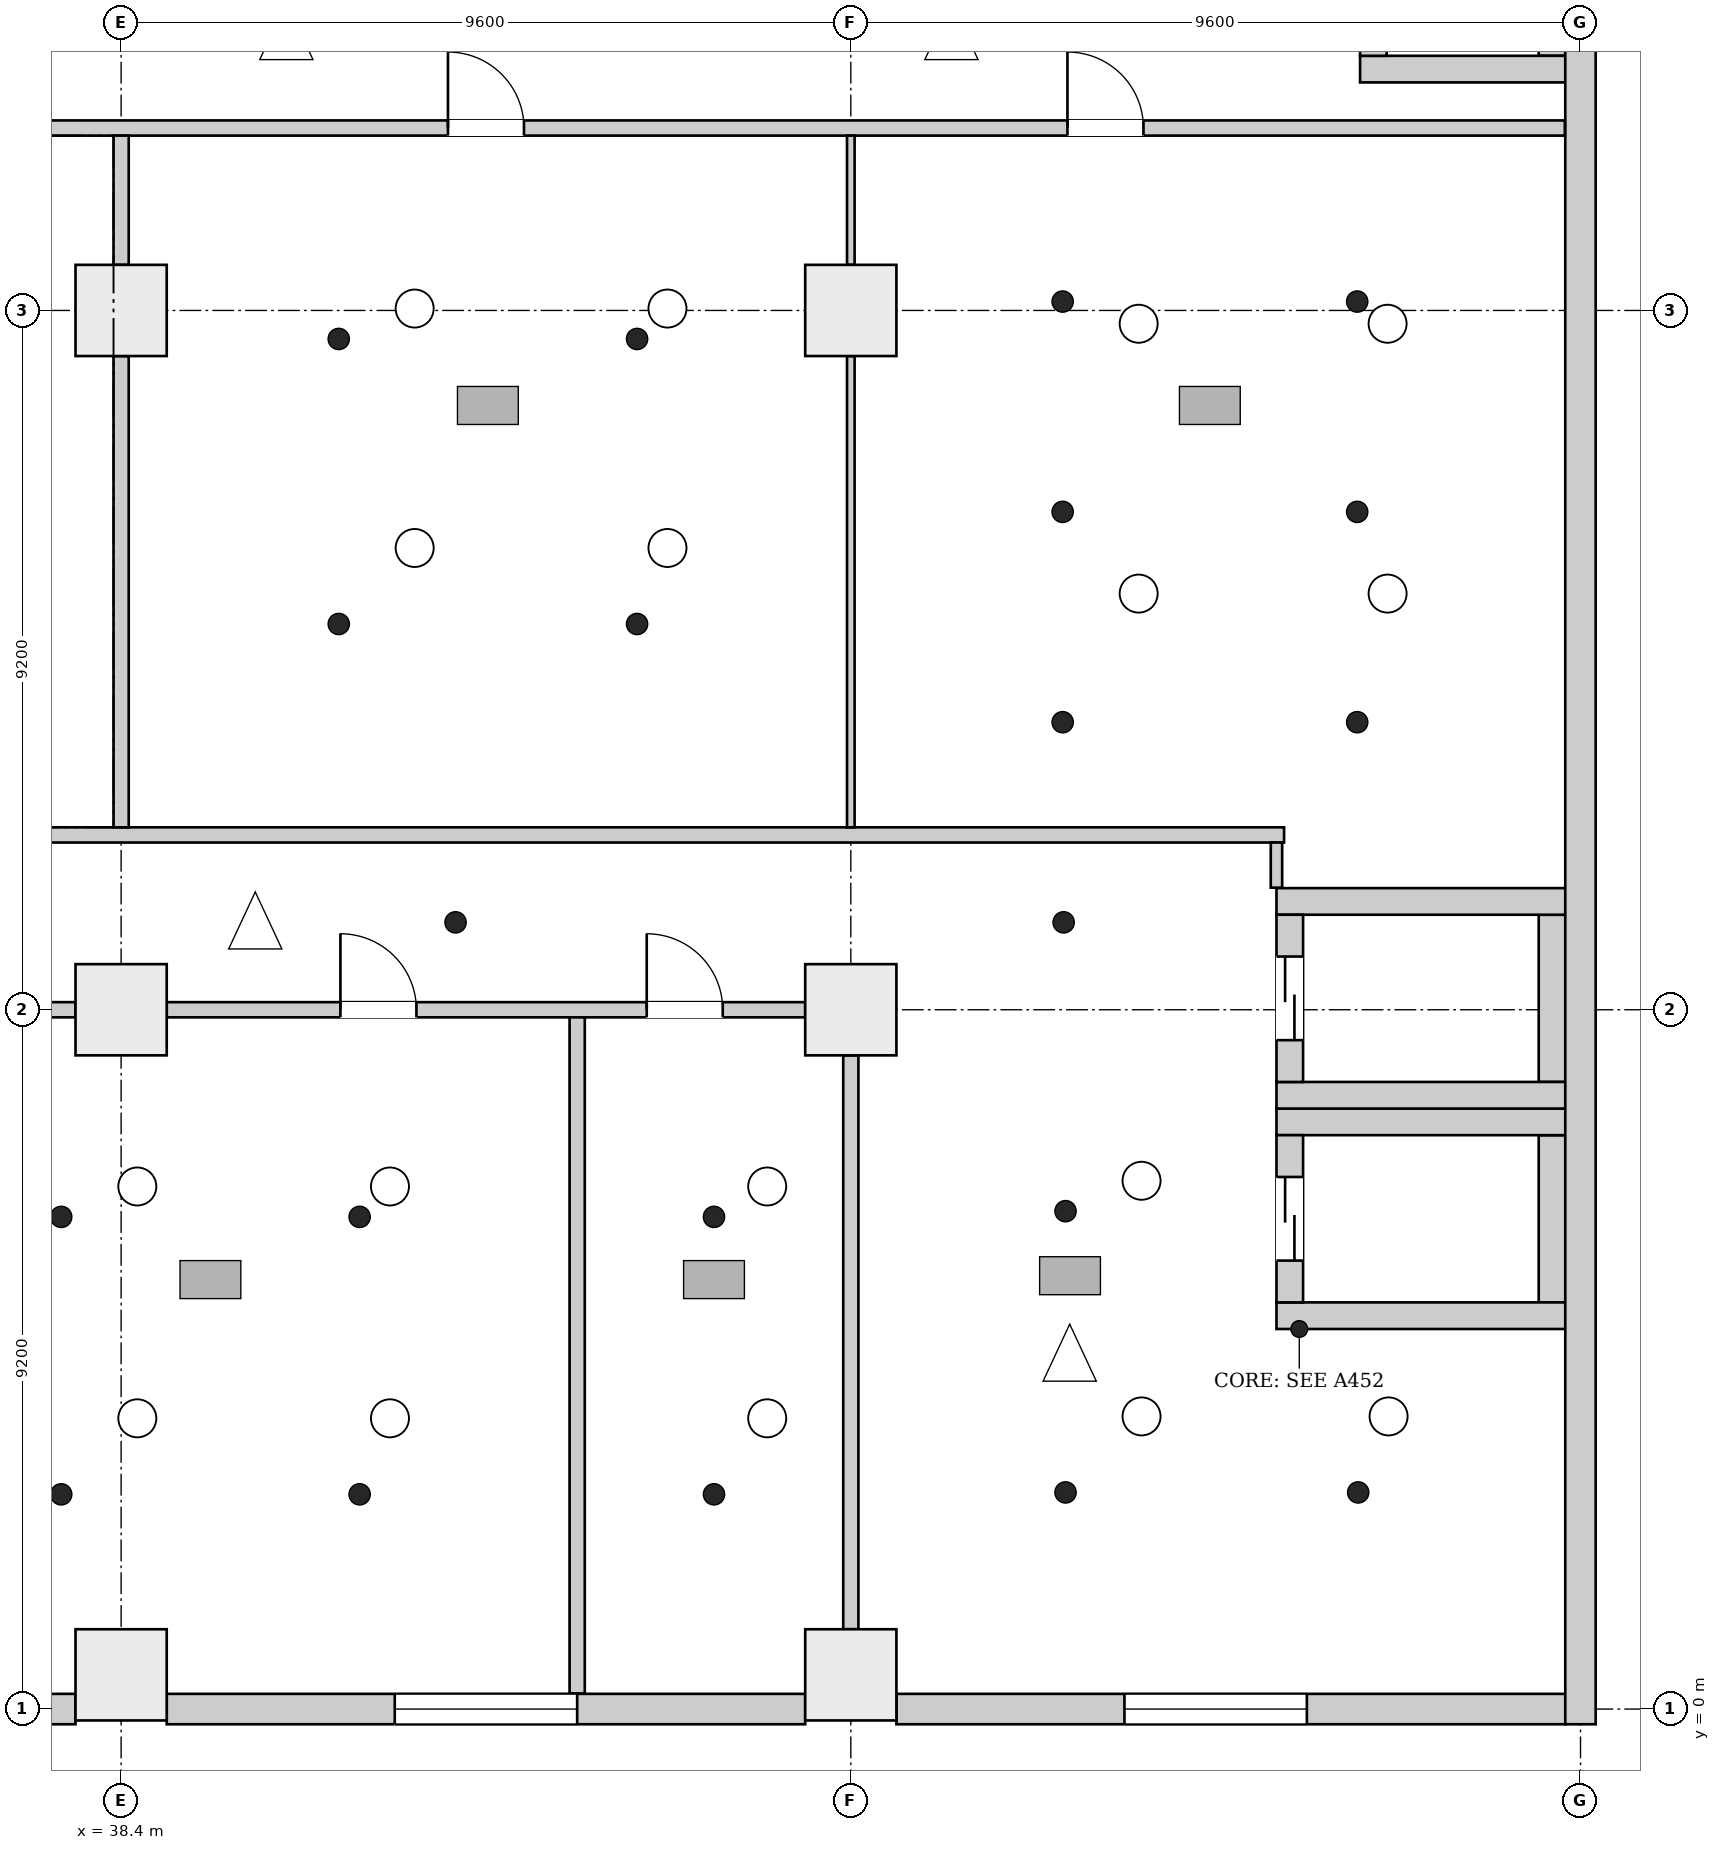
"""IFC4 building model, lengths in metres.
Left out: names, types, materials, properties, quantities, classifications, styles, units other than length and angle.
Written with IfcOpenShell. Run it as: python <this file> out.ifc"""

import sys

from ifc_helpers import new_model, si_unit, direction, frame, frame_2d, origin, origin_2d, place, context, subcontext, project, spatial, rectangle, extrude, element, fill, save


model = new_model("IFC4")
c1 = context("Model", 3, precision=1e-05, world=origin(), true_north=direction((0.0, 1.0)))
c2 = subcontext(c1, "Body", "Model", "MODEL_VIEW")
j1 = project(units=[si_unit("LENGTHUNIT", "METRE"), si_unit("PLANEANGLEUNIT", "RADIAN")], contexts=[c1])
p1 = place(None, origin())
s1 = spatial("IfcSite", under=j1, at=p1, CompositionType="ELEMENT")
p2 = place(p1, origin())
s2 = spatial("IfcBuilding", under=s1, at=p2, CompositionType="ELEMENT")
p3 = place(p2, frame((0.0, 0.0, 14.2)))
s3 = spatial("IfcBuildingStorey", under=s2, at=p3, CompositionType="ELEMENT", Elevation=14.2)
p4 = place(p3, frame((57.6, -0.2, 0.0), z_axis=(0.0, 0.0, 1.0), x_axis=(0.0, 1.0, 0.0)))
e1 = element("IfcWall", 1, at=p4, inside=s3, PredefinedType="SHEAR", context=c2, shape_type="SweptSolid", body=[
    extrude(rectangle(XDim=46.88, YDim=0.4, at=frame_2d((23.44, 0.0))), origin(), (0.0, 0.0, 1.0), 7.5),
])
for number, where, z_axis, x_axis in (
    (2, (53.6, 5.175, 0.0), (0.0, 0.0, 1.0), (1.0, 0.0, 0.0)),
    (3, (53.6, 7.725, 0.0), (0.0, 0.0, 1.0), (1.0, 0.0, 0.0)),
):
    element("IfcWall", number, at=place(p3, frame(where, z_axis=z_axis, x_axis=x_axis)), inside=s3, PredefinedType="SHEAR", context=c2, shape_type="SweptSolid", body=[
        extrude(rectangle(XDim=3.8, YDim=0.35, at=frame_2d((1.9, 0.0))), origin(), (0.0, 0.0, 1.0), 7.5),
    ])
p5 = place(p3, frame((53.775, 5.35, 0.0), z_axis=(0.0, 0.0, 1.0), x_axis=(0.0, 1.0, 0.0)))
e4 = element("IfcWall", 4, at=p5, inside=s3, PredefinedType="SHEAR", context=c2, shape_type="SweptSolid", body=[
    extrude(rectangle(XDim=2.2, YDim=0.35, at=frame_2d((1.1, 0.0))), origin(), (0.0, 0.0, 1.0), 7.5),
])
p6 = place(p5, frame((0.55, 0.0, 0.0)))
e5 = element("IfcOpeningElement", 5, at=p6, cuts=e4, PredefinedType="OPENING", context=c2, shape_type="SweptSolid", body=[
    extrude(rectangle(XDim=1.1, YDim=2.1, at=frame_2d((0.55, 1.05))), frame((0.0, 0.185, 0.0), z_axis=(0.0, -1.0, 0.0), x_axis=(1.0, 0.0, 0.0)), (0.0, 0.0, 1.0), 0.37),
])
p7 = place(p3, frame((57.225, 5.35, 0.0), z_axis=(0.0, 0.0, 1.0), x_axis=(0.0, 1.0, 0.0)))
e6 = element("IfcWall", 6, at=p7, inside=s3, PredefinedType="SHEAR", context=c2, shape_type="SweptSolid", body=[
    extrude(rectangle(XDim=2.2, YDim=0.35, at=frame_2d((1.1, 0.0))), origin(), (0.0, 0.0, 1.0), 7.5),
])
for number, where, z_axis, x_axis in (
    (7, (53.6, 8.075, 0.0), (0.0, 0.0, 1.0), (1.0, 0.0, 0.0)),
    (8, (53.6, 10.625, 0.0), (0.0, 0.0, 1.0), (1.0, 0.0, 0.0)),
):
    element("IfcWall", number, at=place(p3, frame(where, z_axis=z_axis, x_axis=x_axis)), inside=s3, PredefinedType="SHEAR", context=c2, shape_type="SweptSolid", body=[
        extrude(rectangle(XDim=3.8, YDim=0.35, at=frame_2d((1.9, 0.0))), origin(), (0.0, 0.0, 1.0), 7.5),
    ])
p8 = place(p3, frame((53.775, 8.25, 0.0), z_axis=(0.0, 0.0, 1.0), x_axis=(0.0, 1.0, 0.0)))
e9 = element("IfcWall", 9, at=p8, inside=s3, PredefinedType="SHEAR", context=c2, shape_type="SweptSolid", body=[
    extrude(rectangle(XDim=2.2, YDim=0.35, at=frame_2d((1.1, 0.0))), origin(), (0.0, 0.0, 1.0), 7.5),
])
p9 = place(p8, frame((0.55, 0.0, 0.0)))
e10 = element("IfcOpeningElement", 10, at=p9, cuts=e9, PredefinedType="OPENING", context=c2, shape_type="SweptSolid", body=[
    extrude(rectangle(XDim=1.1, YDim=2.1, at=frame_2d((0.55, 1.05))), frame((0.0, 0.185, 0.0), z_axis=(0.0, -1.0, 0.0), x_axis=(1.0, 0.0, 0.0)), (0.0, 0.0, 1.0), 0.37),
])
p10 = place(p3, frame((57.225, 8.25, 0.0), z_axis=(0.0, 0.0, 1.0), x_axis=(0.0, 1.0, 0.0)))
e11 = element("IfcWall", 11, at=p10, inside=s3, PredefinedType="SHEAR", context=c2, shape_type="SweptSolid", body=[
    extrude(rectangle(XDim=2.2, YDim=0.35, at=frame_2d((1.1, 0.0))), origin(), (0.0, 0.0, 1.0), 7.5),
])
p11 = place(p3, frame((54.7, 21.575, 0.0), z_axis=(0.0, 0.0, 1.0), x_axis=(1.0, 0.0, 0.0)))
e12 = element("IfcWall", 12, at=p11, inside=s3, PredefinedType="SHEAR", context=c2, shape_type="SweptSolid", body=[
    extrude(rectangle(XDim=2.7, YDim=0.35, at=frame_2d((1.35, 0.0))), origin(), (0.0, 0.0, 1.0), 7.5),
])
for number, where, z_axis, x_axis in (
    (13, (54.875, 21.75, 0.0), (0.0, 0.0, 1.0), (0.0, 1.0, 0.0)),
    (14, (57.225, 21.75, 0.0), (0.0, 0.0, 1.0), (0.0, 1.0, 0.0)),
):
    element("IfcWall", number, at=place(p3, frame(where, z_axis=z_axis, x_axis=x_axis)), inside=s3, PredefinedType="SHEAR", context=c2, shape_type="SweptSolid", body=[
        extrude(rectangle(XDim=3.5, YDim=0.35, at=frame_2d((1.75, 0.0))), origin(), (0.0, 0.0, 1.0), 7.5),
    ])
for number, where, z_axis, x_axis in (
    (15, (38.4, 0.45, 0.0), (0.0, 0.0, 1.0), (1.0, 0.0, 0.0)),
    (16, (48.0, 0.45, 0.0), (0.0, 0.0, 1.0), (1.0, 0.0, 0.0)),
    (17, (38.4, 9.2, 0.0), (0.0, 0.0, 1.0), (1.0, 0.0, 0.0)),
    (18, (48.0, 9.2, 0.0), (0.0, 0.0, 1.0), (1.0, 0.0, 0.0)),
    (19, (38.4, 18.4, 0.0), (0.0, 0.0, 1.0), (1.0, 0.0, 0.0)),
    (20, (48.0, 18.4, 0.0), (0.0, 0.0, 1.0), (1.0, 0.0, 0.0)),
):
    element("IfcColumn", number, at=place(p3, frame(where, z_axis=z_axis, x_axis=x_axis)), inside=s3, PredefinedType="COLUMN", context=c2, shape_type="SweptSolid", body=[
        extrude(rectangle(XDim=1.2, YDim=1.2, at=origin_2d()), origin(), (0.0, 0.0, 1.0), 7.5),
    ])
p12 = place(p3, frame((29.4, 0.0, 0.0), z_axis=(0.0, 0.0, 1.0), x_axis=(1.0, 0.0, 0.0)))
e21 = element("IfcWall", 21, at=p12, inside=s3, PredefinedType="ELEMENTEDWALL", context=c2, shape_type="SweptSolid", body=[
    extrude(rectangle(XDim=8.4, YDim=0.4, at=frame_2d((4.2, 0.0))), origin(), (0.0, 0.0, 1.0), 7.15),
])
p13 = place(p12, frame((3.0, 0.0, 1.0)))
e22 = element("IfcOpeningElement", 22, at=p13, cuts=e21, PredefinedType="OPENING", context=c2, shape_type="SweptSolid", body=[
    extrude(rectangle(XDim=2.4, YDim=2.2, at=frame_2d((1.2, 1.1))), frame((0.0, 0.21, 0.0), z_axis=(0.0, -1.0, 0.0), x_axis=(1.0, 0.0, 0.0)), (0.0, 0.0, 1.0), 0.42),
])
p14 = place(p3, frame((39.0, 0.0, 0.0), z_axis=(0.0, 0.0, 1.0), x_axis=(1.0, 0.0, 0.0)))
e23 = element("IfcWall", 23, at=p14, inside=s3, PredefinedType="ELEMENTEDWALL", context=c2, shape_type="SweptSolid", body=[
    extrude(rectangle(XDim=8.4, YDim=0.4, at=frame_2d((4.2, 0.0))), origin(), (0.0, 0.0, 1.0), 7.15),
])
p15 = place(p14, frame((3.0, 0.0, 1.0)))
e24 = element("IfcOpeningElement", 24, at=p15, cuts=e23, PredefinedType="OPENING", context=c2, shape_type="SweptSolid", body=[
    extrude(rectangle(XDim=2.4, YDim=2.2, at=frame_2d((1.2, 1.1))), frame((0.0, 0.21, 0.0), z_axis=(0.0, -1.0, 0.0), x_axis=(1.0, 0.0, 0.0)), (0.0, 0.0, 1.0), 0.42),
])
p16 = place(p3, frame((48.6, 0.0, 0.0), z_axis=(0.0, 0.0, 1.0), x_axis=(1.0, 0.0, 0.0)))
e25 = element("IfcWall", 25, at=p16, inside=s3, PredefinedType="ELEMENTEDWALL", context=c2, shape_type="SweptSolid", body=[
    extrude(rectangle(XDim=8.8, YDim=0.4, at=frame_2d((4.4, 0.0))), origin(), (0.0, 0.0, 1.0), 7.15),
])
p17 = place(p16, frame((3.0, 0.0, 1.0)))
e26 = element("IfcOpeningElement", 26, at=p17, cuts=e25, PredefinedType="OPENING", context=c2, shape_type="SweptSolid", body=[
    extrude(rectangle(XDim=2.4, YDim=2.2, at=frame_2d((1.2, 1.1))), frame((0.0, 0.21, 0.0), z_axis=(0.0, -1.0, 0.0), x_axis=(1.0, 0.0, 0.0)), (0.0, 0.0, 1.0), 0.42),
])
p18 = place(p3, frame((27.206, 11.5, 0.0), z_axis=(0.0, 0.0, 1.0), x_axis=(1.0, 0.0, 0.0)))
e27 = element("IfcWall", 27, at=p18, inside=s3, PredefinedType="PARTITIONING", context=c2, shape_type="SweptSolid", body=[
    extrude(rectangle(XDim=26.494, YDim=0.2, at=frame_2d((13.247, 0.0))), origin(), (0.0, 0.0, 1.0), 7.15),
])
p19 = place(p3, frame((28.9, 20.8, 0.0), z_axis=(0.0, 0.0, 1.0), x_axis=(1.0, 0.0, 0.0)))
e28 = element("IfcWall", 28, at=p19, inside=s3, PredefinedType="PARTITIONING", context=c2, shape_type="SweptSolid", body=[
    extrude(rectangle(XDim=28.494, YDim=0.2, at=frame_2d((14.247, 0.0))), origin(), (0.0, 0.0, 1.0), 7.15),
])
p20 = place(p19, frame((4.335, 0.0, 0.0)))
e29 = element("IfcOpeningElement", 29, at=p20, cuts=e28, PredefinedType="OPENING", context=c2, shape_type="SweptSolid", body=[
    extrude(rectangle(XDim=1.0, YDim=2.1, at=frame_2d((0.5, 1.05))), frame((0.0, 0.11, 0.0), z_axis=(0.0, -1.0, 0.0), x_axis=(1.0, 0.0, 0.0)), (0.0, 0.0, 1.0), 0.22),
])
p21 = place(p19, frame((13.8, 0.0, 0.0)))
e30 = element("IfcOpeningElement", 30, at=p21, cuts=e28, PredefinedType="OPENING", context=c2, shape_type="SweptSolid", body=[
    extrude(rectangle(XDim=1.0, YDim=2.1, at=frame_2d((0.5, 1.05))), frame((0.0, 0.11, 0.0), z_axis=(0.0, -1.0, 0.0), x_axis=(1.0, 0.0, 0.0)), (0.0, 0.0, 1.0), 0.22),
])
p22 = place(p19, frame((21.95, 0.0, 0.0)))
e31 = element("IfcOpeningElement", 31, at=p22, cuts=e28, PredefinedType="OPENING", context=c2, shape_type="SweptSolid", body=[
    extrude(rectangle(XDim=1.0, YDim=2.1, at=frame_2d((0.5, 1.05))), frame((0.0, 0.11, 0.0), z_axis=(0.0, -1.0, 0.0), x_axis=(1.0, 0.0, 0.0)), (0.0, 0.0, 1.0), 0.22),
])
p23 = place(p3, frame((29.4, 9.2, 0.0), z_axis=(0.0, 0.0, 1.0), x_axis=(1.0, 0.0, 0.0)))
e32 = element("IfcWall", 32, at=p23, inside=s3, PredefinedType="PARTITIONING", context=c2, shape_type="SweptSolid", body=[
    extrude(rectangle(XDim=8.4, YDim=0.2, at=frame_2d((4.2, 0.0))), origin(), (0.0, 0.0, 1.0), 6.75),
])
p24 = place(p3, frame((38.4, 11.6, 0.0), z_axis=(0.0, 0.0, 1.0), x_axis=(0.0, 1.0, 0.0)))
e33 = element("IfcWall", 33, at=p24, inside=s3, PredefinedType="PARTITIONING", context=c2, shape_type="SweptSolid", body=[
    extrude(rectangle(XDim=6.2, YDim=0.2, at=frame_2d((3.1, 0.0))), origin(), (0.0, 0.0, 1.0), 6.75),
])
p25 = place(p3, frame((38.4, 19.0, 0.0), z_axis=(0.0, 0.0, 1.0), x_axis=(0.0, 1.0, 0.0)))
e34 = element("IfcWall", 34, at=p25, inside=s3, PredefinedType="PARTITIONING", context=c2, shape_type="SweptSolid", body=[
    extrude(rectangle(XDim=1.7, YDim=0.2, at=frame_2d((0.85, 0.0))), origin(), (0.0, 0.0, 1.0), 6.75),
])
p26 = place(p3, frame((39.0, 9.2, 0.0), z_axis=(0.0, 0.0, 1.0), x_axis=(1.0, 0.0, 0.0)))
e35 = element("IfcWall", 35, at=p26, inside=s3, PredefinedType="PARTITIONING", context=c2, shape_type="SweptSolid", body=[
    extrude(rectangle(XDim=8.4, YDim=0.2, at=frame_2d((4.2, 0.0))), origin(), (0.0, 0.0, 1.0), 6.75),
])
p27 = place(p26, frame((2.285, 0.0, 0.0)))
e36 = element("IfcOpeningElement", 36, at=p27, cuts=e35, PredefinedType="OPENING", context=c2, shape_type="SweptSolid", body=[
    extrude(rectangle(XDim=1.0, YDim=2.1, at=frame_2d((0.5, 1.05))), frame((0.0, 0.11, 0.0), z_axis=(0.0, -1.0, 0.0), x_axis=(1.0, 0.0, 0.0)), (0.0, 0.0, 1.0), 0.22),
])
p28 = place(p26, frame((6.315, 0.0, 0.0)))
e37 = element("IfcOpeningElement", 37, at=p28, cuts=e35, PredefinedType="OPENING", context=c2, shape_type="SweptSolid", body=[
    extrude(rectangle(XDim=1.0, YDim=2.1, at=frame_2d((0.5, 1.05))), frame((0.0, 0.11, 0.0), z_axis=(0.0, -1.0, 0.0), x_axis=(1.0, 0.0, 0.0)), (0.0, 0.0, 1.0), 0.22),
])
p29 = place(p3, frame((44.4, 0.206, 0.0), z_axis=(0.0, 0.0, 1.0), x_axis=(0.0, 1.0, 0.0)))
e38 = element("IfcWall", 38, at=p29, inside=s3, PredefinedType="PARTITIONING", context=c2, shape_type="SweptSolid", body=[
    extrude(rectangle(XDim=8.894, YDim=0.2, at=frame_2d((4.447, 0.0))), origin(), (0.0, 0.0, 1.0), 7.15),
])
p30 = place(p3, frame((48.0, 1.05, 0.0), z_axis=(0.0, 0.0, 1.0), x_axis=(0.0, 1.0, 0.0)))
e39 = element("IfcWall", 39, at=p30, inside=s3, PredefinedType="PARTITIONING", context=c2, shape_type="SweptSolid", body=[
    extrude(rectangle(XDim=7.55, YDim=0.2, at=frame_2d((3.775, 0.0))), origin(), (0.0, 0.0, 1.0), 6.75),
])
p31 = place(p3, frame((48.0, 11.6, 0.0), z_axis=(0.0, 0.0, 1.0), x_axis=(0.0, 1.0, 0.0)))
e40 = element("IfcWall", 40, at=p31, inside=s3, PredefinedType="PARTITIONING", context=c2, shape_type="SweptSolid", body=[
    extrude(rectangle(XDim=6.2, YDim=0.1, at=frame_2d((3.1, 0.0))), origin(), (0.0, 0.0, 1.0), 6.75),
])
p32 = place(p3, frame((48.0, 19.0, 0.0), z_axis=(0.0, 0.0, 1.0), x_axis=(0.0, 1.0, 0.0)))
e41 = element("IfcWall", 41, at=p32, inside=s3, PredefinedType="PARTITIONING", context=c2, shape_type="SweptSolid", body=[
    extrude(rectangle(XDim=1.7, YDim=0.1, at=frame_2d((0.85, 0.0))), origin(), (0.0, 0.0, 1.0), 6.75),
])
p33 = place(p3, frame((53.6, 10.806, 0.0), z_axis=(0.0, 0.0, 1.0), x_axis=(0.0, 1.0, 0.0)))
e42 = element("IfcWall", 42, at=p33, inside=s3, PredefinedType="PARTITIONING", context=c2, shape_type="SweptSolid", body=[
    extrude(rectangle(XDim=0.594, YDim=0.15, at=frame_2d((0.297, 0.0))), origin(), (0.0, 0.0, 1.0), 7.15),
])
p34 = place(p15, origin())
e43 = element("IfcWindow", 43, at=p34, inside=s3, PartitioningType="SINGLE_PANEL", PredefinedType="WINDOW", context=c2, shape_type="SweptSolid", body=[
    extrude(rectangle(XDim=2.4, YDim=2.2, at=frame_2d((1.2, 1.1))), frame((0.0, 0.03, 0.0), z_axis=(0.0, -1.0, 0.0), x_axis=(1.0, 0.0, 0.0)), (0.0, 0.0, 1.0), 0.06),
])
fill(e24, e43)
p35 = place(p17, origin())
e44 = element("IfcWindow", 44, at=p35, inside=s3, PartitioningType="SINGLE_PANEL", PredefinedType="WINDOW", context=c2, shape_type="SweptSolid", body=[
    extrude(rectangle(XDim=2.4, YDim=2.2, at=frame_2d((1.2, 1.1))), frame((0.0, 0.03, 0.0), z_axis=(0.0, -1.0, 0.0), x_axis=(1.0, 0.0, 0.0)), (0.0, 0.0, 1.0), 0.06),
])
fill(e26, e44)
p36 = place(p6, origin())
e45 = element("IfcDoor", 45, at=p36, inside=s3, OperationType="DOUBLE_DOOR_SLIDING", PredefinedType="DOOR", context=c2, shape_type="SweptSolid", body=[
    extrude(rectangle(XDim=1.1, YDim=2.1, at=frame_2d((0.55, 1.05))), frame((0.0, 0.025, 0.0), z_axis=(0.0, -1.0, 0.0), x_axis=(1.0, 0.0, 0.0)), (0.0, 0.0, 1.0), 0.05),
])
fill(e5, e45)
p37 = place(p9, origin())
e46 = element("IfcDoor", 46, at=p37, inside=s3, OperationType="DOUBLE_DOOR_SLIDING", PredefinedType="DOOR", context=c2, shape_type="SweptSolid", body=[
    extrude(rectangle(XDim=1.1, YDim=2.1, at=frame_2d((0.55, 1.05))), frame((0.0, 0.025, 0.0), z_axis=(0.0, -1.0, 0.0), x_axis=(1.0, 0.0, 0.0)), (0.0, 0.0, 1.0), 0.05),
])
fill(e10, e46)
p38 = place(p21, origin())
e47 = element("IfcDoor", 47, at=p38, inside=s3, OperationType="SINGLE_SWING_LEFT", PredefinedType="DOOR", context=c2, shape_type="SweptSolid", body=[
    extrude(rectangle(XDim=1.0, YDim=2.1, at=frame_2d((0.5, 1.05))), frame((0.0, 0.025, 0.0), z_axis=(0.0, -1.0, 0.0), x_axis=(1.0, 0.0, 0.0)), (0.0, 0.0, 1.0), 0.05),
])
fill(e30, e47)
p39 = place(p22, origin())
e48 = element("IfcDoor", 48, at=p39, inside=s3, OperationType="SINGLE_SWING_LEFT", PredefinedType="DOOR", context=c2, shape_type="SweptSolid", body=[
    extrude(rectangle(XDim=1.0, YDim=2.1, at=frame_2d((0.5, 1.05))), frame((0.0, 0.025, 0.0), z_axis=(0.0, -1.0, 0.0), x_axis=(1.0, 0.0, 0.0)), (0.0, 0.0, 1.0), 0.05),
])
fill(e31, e48)
p40 = place(p27, origin())
e49 = element("IfcDoor", 49, at=p40, inside=s3, OperationType="SINGLE_SWING_RIGHT", PredefinedType="DOOR", context=c2, shape_type="SweptSolid", body=[
    extrude(rectangle(XDim=1.0, YDim=2.1, at=frame_2d((0.5, 1.05))), frame((0.0, 0.025, 0.0), z_axis=(0.0, -1.0, 0.0), x_axis=(1.0, 0.0, 0.0)), (0.0, 0.0, 1.0), 0.05),
])
fill(e36, e49)
p41 = place(p28, origin())
e50 = element("IfcDoor", 50, at=p41, inside=s3, OperationType="SINGLE_SWING_RIGHT", PredefinedType="DOOR", context=c2, shape_type="SweptSolid", body=[
    extrude(rectangle(XDim=1.0, YDim=2.1, at=frame_2d((0.5, 1.05))), frame((0.0, 0.025, 0.0), z_axis=(0.0, -1.0, 0.0), x_axis=(1.0, 0.0, 0.0)), (0.0, 0.0, 1.0), 0.05),
])
fill(e37, e50)
save(model, sys.argv[1])
